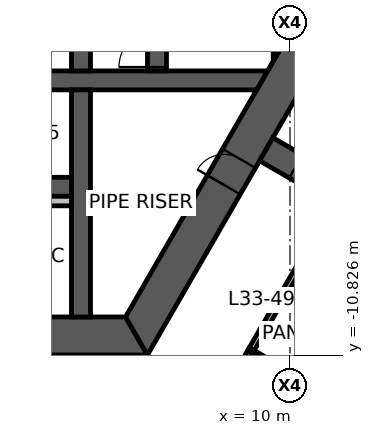
"""IFC4 building model, lengths in metres.
Left out: names, types, materials, properties, quantities, classifications, styles, units other than length and angle.
Written with IfcOpenShell. Run it as: python <this file> out.ifc"""

import sys

from ifc_helpers import new_model, si_unit, direction, frame, frame_2d, origin, place, context, subcontext, project, spatial, polyline, rectangle, outline, extrude, element, fill, save


model = new_model("IFC4")
c1 = context("Model", 3, precision=1e-05, world=origin(), true_north=direction((0.0, 1.0)))
c2 = subcontext(c1, "Body", "Model", "MODEL_VIEW")
j1 = project(units=[si_unit("LENGTHUNIT", "METRE"), si_unit("PLANEANGLEUNIT", "RADIAN")], contexts=[c1])
p1 = place(None, origin())
s1 = spatial("IfcSite", under=j1, at=p1, CompositionType="ELEMENT")
p2 = place(p1, origin())
s2 = spatial("IfcBuilding", under=s1, at=p2, CompositionType="ELEMENT")
p3 = place(p2, frame((0.0, 0.0, 133.1)))
s3 = spatial("IfcBuildingStorey", under=s2, at=p3, CompositionType="ELEMENT", Elevation=133.1)
p4 = place(p3, frame((-5.961, -10.325, 0.0), z_axis=(0.0, 0.0, 1.0), x_axis=(1.0, 0.0, 0.0)))
e1 = element("IfcWall", 1, at=p4, inside=s3, PredefinedType="SHEAR", context=c2, shape_type="SweptSolid", body=[
    extrude(outline(polyline([(-0.289, -0.5), (5.461, -0.5), (6.461, -0.5), (12.211, -0.5), (11.634, 0.5), (6.461, 0.5), (5.461, 0.5), (0.289, 0.5), (-0.289, -0.5)])), origin(), (0.0, 0.0, 1.0), 3.9),
])
p5 = place(p4, frame((5.461, 0.0, 0.0)))
e2 = element("IfcOpeningElement", 2, at=p5, cuts=e1, PredefinedType="OPENING", context=c2, shape_type="SweptSolid", body=[
    extrude(rectangle(XDim=1.0, YDim=2.1, at=frame_2d((0.5, 1.05))), frame((0.0, 0.51, 0.0), z_axis=(0.0, -1.0, 0.0), x_axis=(1.0, 0.0, 0.0)), (0.0, 0.0, 1.0), 1.02),
])
p6 = place(p3, frame((5.961, -10.325, 0.0), z_axis=(0.0, 0.0, 1.0), x_axis=(0.500004296715, 0.866022923061, 0.0)))
e3 = element("IfcWall", 3, at=p6, inside=s3, PredefinedType="SHEAR", context=c2, shape_type="SweptSolid", body=[
    extrude(outline(polyline([(-0.289, -0.5), (4.594, -0.5), (5.394, -0.5), (12.211, -0.5), (11.634, 0.5), (5.394, 0.5), (4.594, 0.5), (0.289, 0.5), (-0.289, -0.5)])), origin(), (0.0, 0.0, 1.0), 3.9),
])
p7 = place(p6, frame((4.594, 0.0, 0.0)))
e4 = element("IfcOpeningElement", 4, at=p7, cuts=e3, PredefinedType="OPENING", context=c2, shape_type="SweptSolid", body=[
    extrude(rectangle(XDim=0.8, YDim=2.1, at=frame_2d((0.4, 1.05))), frame((0.0, 0.51, 0.0), z_axis=(0.0, -1.0, 0.0), x_axis=(1.0, 0.0, 0.0)), (0.0, 0.0, 1.0), 1.02),
])
p8 = place(p3, frame((9.375, -5.413, 0.0), z_axis=(0.0, 0.0, 1.0), x_axis=(0.866032377459, -0.499987921047, 0.0)))
e5 = element("IfcWall", 5, at=p8, inside=s3, PredefinedType="SHEAR", context=c2, shape_type="SweptSolid", body=[
    extrude(rectangle(XDim=7.696, YDim=0.7, at=frame_2d((3.848, 0.0))), origin(), (0.0, 0.0, 1.0), 3.9),
])
p9 = place(p8, frame((0.9, 0.0, 0.0)))
e6 = element("IfcOpeningElement", 6, at=p9, cuts=e5, PredefinedType="OPENING", context=c2, shape_type="SweptSolid", body=[
    extrude(rectangle(XDim=1.0, YDim=2.1, at=frame_2d((0.5, 1.05))), frame((0.0, 0.36, 0.0), z_axis=(0.0, -1.0, 0.0), x_axis=(1.0, 0.0, 0.0)), (0.0, 0.0, 1.0), 0.72),
])
p10 = place(p3, frame((1.35, -3.6, 0.0), z_axis=(0.0, 0.0, 1.0), x_axis=(1.0, 0.0, 0.0)))
e7 = element("IfcWall", 7, at=p10, inside=s3, PredefinedType="SHEAR", context=c2, shape_type="SweptSolid", body=[
    extrude(outline(polyline([(0.0, -0.25), (1.15, -0.25), (2.25, -0.25), (7.772, -0.25), (8.061, 0.25), (2.25, 0.25), (1.15, 0.25), (0.0, 0.25), (0.0, -0.25)])), origin(), (0.0, 0.0, 1.0), 3.9),
])
p11 = place(p10, frame((1.15, 0.0, 0.0)))
e8 = element("IfcOpeningElement", 8, at=p11, cuts=e7, PredefinedType="OPENING", context=c2, shape_type="SweptSolid", body=[
    extrude(rectangle(XDim=1.1, YDim=2.1, at=frame_2d((0.55, 1.05))), frame((0.0, 0.26, 0.0), z_axis=(0.0, -1.0, 0.0), x_axis=(1.0, 0.0, 0.0)), (0.0, 0.0, 1.0), 0.52),
])
p12 = place(p3, frame((4.5, -3.35, 0.0), z_axis=(0.0, 0.0, 1.0), x_axis=(0.0, 1.0, 0.0)))
e9 = element("IfcWall", 9, at=p12, inside=s3, PredefinedType="SHEAR", context=c2, shape_type="SweptSolid", body=[
    extrude(rectangle(XDim=6.7, YDim=0.5, at=frame_2d((3.35, 0.0))), origin(), (0.0, 0.0, 1.0), 3.9),
])
p13 = place(p12, frame((2.85, 0.0, 0.0)))
e10 = element("IfcOpeningElement", 10, at=p13, cuts=e9, PredefinedType="OPENING", context=c2, shape_type="SweptSolid", body=[
    extrude(rectangle(XDim=1.0, YDim=2.1, at=frame_2d((0.5, 1.05))), frame((0.0, 0.26, 0.0), z_axis=(0.0, -1.0, 0.0), x_axis=(1.0, 0.0, 0.0)), (0.0, 0.0, 1.0), 0.52),
])
p14 = place(p3, frame((6.5, -3.35, 0.0), z_axis=(0.0, 0.0, 1.0), x_axis=(0.0, 1.0, 0.0)))
e11 = element("IfcWall", 11, at=p14, inside=s3, PredefinedType="SHEAR", context=c2, shape_type="SweptSolid", body=[
    extrude(rectangle(XDim=6.7, YDim=0.5, at=frame_2d((3.35, 0.0))), origin(), (0.0, 0.0, 1.0), 3.9),
])
p15 = place(p14, frame((0.1, 0.0, 0.0)))
e12 = element("IfcOpeningElement", 12, at=p15, cuts=e11, PredefinedType="OPENING", context=c2, shape_type="SweptSolid", body=[
    extrude(rectangle(XDim=1.0, YDim=2.1, at=frame_2d((0.5, 1.05))), frame((0.0, 0.26, 0.0), z_axis=(0.0, -1.0, 0.0), x_axis=(1.0, 0.0, 0.0)), (0.0, 0.0, 1.0), 0.52),
])
p16 = place(p3, frame((4.5, -3.85, 0.0), z_axis=(0.0, 0.0, 1.0), x_axis=(0.0, -1.0, 0.0)))
e13 = element("IfcWall", 13, at=p16, inside=s3, PredefinedType="SHEAR", context=c2, shape_type="SweptSolid", body=[
    extrude(rectangle(XDim=5.975, YDim=0.5, at=frame_2d((2.987, 0.0))), origin(), (0.0, 0.0, 1.0), 3.9),
])
p17 = place(p3, frame((1.85, -6.4, 0.0), z_axis=(0.0, 0.0, 1.0), x_axis=(1.0, 0.0, 0.0)))
e14 = element("IfcWall", 14, at=p17, inside=s3, PredefinedType="SHEAR", context=c2, shape_type="SweptSolid", body=[
    extrude(rectangle(XDim=2.4, YDim=0.5, at=frame_2d((1.2, 0.0))), origin(), (0.0, 0.0, 1.0), 3.9),
])
p18 = place(p3, frame((9.808, -2.662, 0.0), z_axis=(0.0, 0.0, 1.0), x_axis=(0.0, 1.0, 0.0)))
e15 = element("IfcWall", 15, at=p18, inside=s3, PredefinedType="SHEAR", context=c2, shape_type="SweptSolid", body=[
    extrude(outline(polyline([(0.433, -0.25), (4.892, -0.25), (5.758, 0.25), (-0.433, 0.25), (0.433, -0.25)])), origin(), (0.0, 0.0, 1.0), 3.9),
])
p19 = place(p3, frame((1.85, -6.775, 0.0), z_axis=(0.0, 0.0, 1.0), x_axis=(1.0, 0.0, 0.0)))
e16 = element("IfcWall", 16, at=p19, inside=s3, PredefinedType="PLUMBINGWALL", context=c2, shape_type="SweptSolid", body=[
    extrude(rectangle(XDim=2.4, YDim=0.25, at=frame_2d((1.2, 0.0))), origin(), (0.0, 0.0, 1.0), 3.9),
])
p20 = place(p3, frame((10.292, -8.425, 0.0), z_axis=(0.0, 0.0, 1.0), x_axis=(-0.499966561876, -0.866044708433, 0.0)))
e17 = element("IfcWall", 17, at=p20, inside=s3, PredefinedType="PARTITIONING", context=c2, shape_type="SweptSolid", body=[
    extrude(rectangle(XDim=2.655, YDim=0.15, at=frame_2d((1.328, 0.0))), origin(), (0.0, 0.0, 1.0), 2.95),
])
p21 = place(p3, frame((8.969, -10.716, 0.0), z_axis=(0.0, 0.0, 1.0), x_axis=(-0.500008568482, -0.866020456713, 0.0)))
e18 = element("IfcWall", 18, at=p21, inside=s3, PredefinedType="PARTITIONING", context=c2, shape_type="SweptSolid", body=[
    extrude(rectangle(XDim=2.782, YDim=0.15, at=frame_2d((1.391, 0.0))), origin(), (0.0, 0.0, 1.0), 2.95),
])
p22 = place(p3, frame((11.392, -12.119, 0.0), z_axis=(0.0, 0.0, 1.0), x_axis=(-0.865255114713, 0.501331812737, 0.0)))
e19 = element("IfcWall", 19, at=p22, inside=s3, PredefinedType="PARTITIONING", context=c2, shape_type="SweptSolid", body=[
    extrude(rectangle(XDim=2.8, YDim=0.1, at=frame_2d((1.4, 0.0))), origin(), (0.0, 0.0, 1.0), 2.95),
])
p23 = place(p22, frame((1.6, 0.0, 0.0)))
e20 = element("IfcOpeningElement", 20, at=p23, cuts=e19, PredefinedType="OPENING", context=c2, shape_type="SweptSolid", body=[
    extrude(rectangle(XDim=0.9, YDim=2.1, at=frame_2d((0.45, 1.05))), frame((0.0, 0.06, 0.0), z_axis=(0.0, -1.0, 0.0), x_axis=(1.0, 0.0, 0.0)), (0.0, 0.0, 1.0), 0.12),
])
p24 = place(p7, origin())
e21 = element("IfcDoor", 21, at=p24, inside=s3, OperationType="SINGLE_SWING_LEFT", PredefinedType="DOOR", context=c2, shape_type="SweptSolid", body=[
    extrude(rectangle(XDim=0.8, YDim=2.1, at=frame_2d((0.4, 1.05))), frame((0.0, 0.025, 0.0), z_axis=(0.0, -1.0, 0.0), x_axis=(1.0, 0.0, 0.0)), (0.0, 0.0, 1.0), 0.05),
])
fill(e4, e21)
p25 = place(p15, origin())
e22 = element("IfcDoor", 22, at=p25, inside=s3, OperationType="SINGLE_SWING_LEFT", PredefinedType="DOOR", context=c2, shape_type="SweptSolid", body=[
    extrude(rectangle(XDim=1.0, YDim=2.1, at=frame_2d((0.5, 1.05))), frame((0.0, 0.025, 0.0), z_axis=(0.0, -1.0, 0.0), x_axis=(1.0, 0.0, 0.0)), (0.0, 0.0, 1.0), 0.05),
])
fill(e12, e22)
save(model, sys.argv[1])
